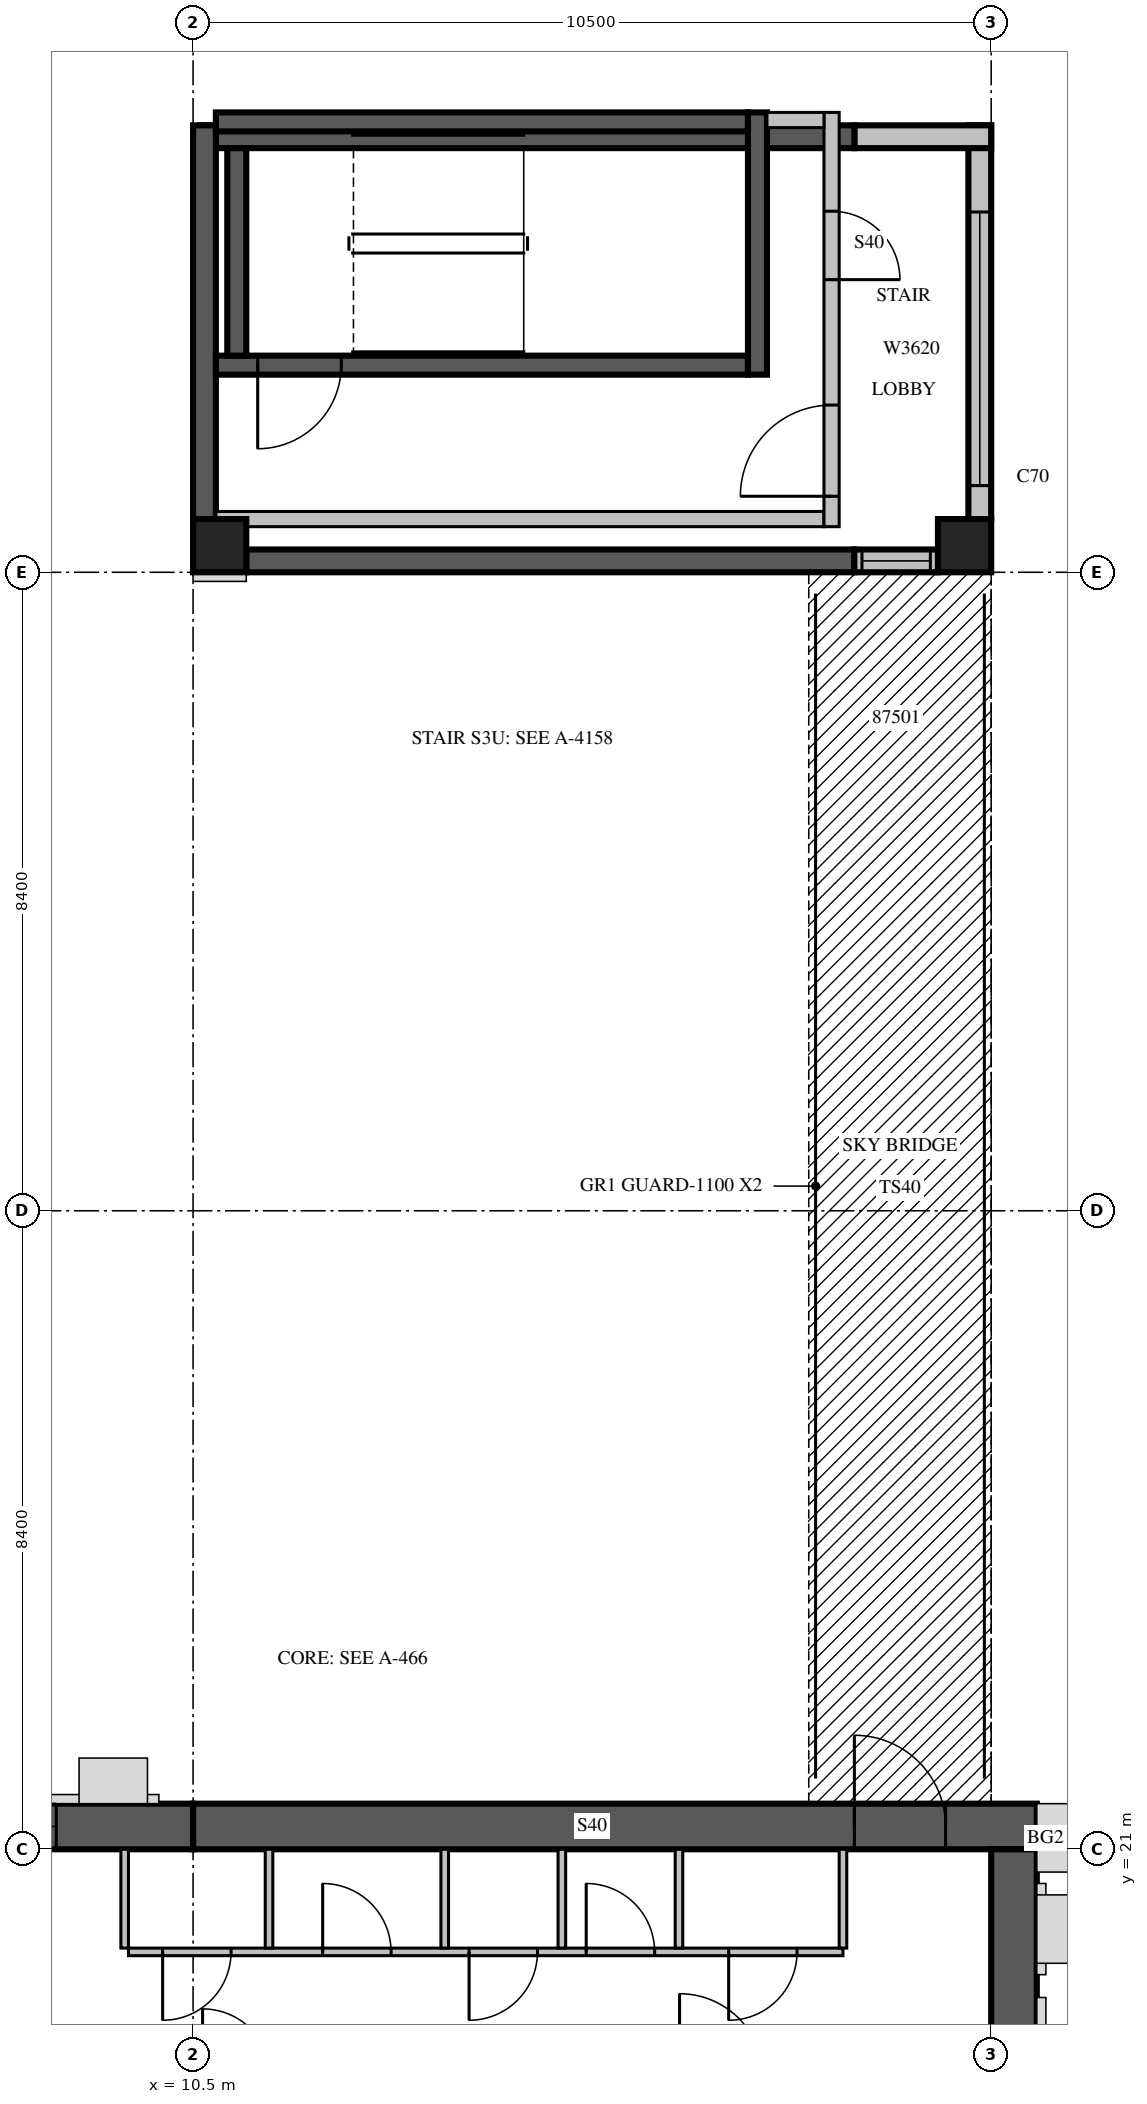
"""IFC4 building model, lengths in metres.
Left out: names, types, materials, properties, quantities, classifications, styles, units other than length and angle.
Written with IfcOpenShell. Run it as: python <this file> out.ifc"""

import sys

from ifc_helpers import new_model, si_unit, direction, frame, frame_2d, origin, origin_2d, place, context, subcontext, project, spatial, rectangle, extrude, source, transform, mapped, element, fill, save


model = new_model("IFC4")
c1 = context("Model", 3, precision=1e-05, world=origin(), true_north=direction((0.0, 1.0)))
c2 = subcontext(c1, "Body", "Model", "MODEL_VIEW")
j1 = project(units=[si_unit("LENGTHUNIT", "METRE"), si_unit("PLANEANGLEUNIT", "RADIAN")], contexts=[c1])
p1 = place(None, origin())
s1 = spatial("IfcSite", under=j1, at=p1, CompositionType="ELEMENT")
p2 = place(p1, origin())
s2 = spatial("IfcBuilding", under=s1, at=p2, CompositionType="ELEMENT")
p3 = place(p2, frame((0.0, 0.0, 323.0)))
s3 = spatial("IfcBuildingStorey", under=s2, at=p3, CompositionType="ELEMENT", Elevation=323.0)
m1 = source(origin(), c2, "Body", "SweptSolid", [
    extrude(rectangle(XDim=0.7, YDim=0.7, at=origin_2d()), origin(), (0.0, 0.0, 1.0), 3.5),
])
for number, where, z_axis, x_axis in (
    (1, (10.85, 38.15, 0.0), (0.0, 0.0, 1.0), (1.0, 0.0, 0.0)),
    (2, (20.65, 38.15, 0.0), (0.0, 0.0, 1.0), (1.0, 0.0, 0.0)),
):
    element("IfcColumn", number, at=place(p3, frame(where, z_axis=z_axis, x_axis=x_axis)), inside=s3, PredefinedType="COLUMN", context=c2, shape_type="MappedRepresentation", body=[
        mapped(m1, transform((0.0, 0.0, 0.0), scale=1.0)),
    ])
m2 = source(origin(), c2, "Body", "SweptSolid", [
    extrude(rectangle(XDim=11.1, YDim=0.6, at=frame_2d((5.55, 0.0))), origin(), (0.0, 0.0, 1.0), 3.5),
])
p4 = place(p3, frame((10.5, 21.3, 0.0), z_axis=(0.0, 0.0, 1.0), x_axis=(1.0, 0.0, 0.0)))
e3 = element("IfcWall", 3, at=p4, inside=s3, PredefinedType="SHEAR", context=c2, shape_type="MappedRepresentation", body=[
    mapped(m2, transform((0.0, 0.0, 0.0), scale=1.0)),
])
m3 = source(origin(), c2, "Body", "SweptSolid", [
    extrude(rectangle(XDim=1.2, YDim=2.1, at=frame_2d((0.6, 1.05))), frame((0.0, 0.31, 0.0), z_axis=(0.0, -1.0, 0.0), x_axis=(1.0, 0.0, 0.0)), (0.0, 0.0, 1.0), 0.62),
])
p5 = place(p4, frame((8.7, 0.0, 0.0)))
e4 = element("IfcOpeningElement", 4, at=p5, cuts=e3, PredefinedType="OPENING", context=c2, shape_type="MappedRepresentation", body=[
    mapped(m3, transform((0.0, 0.0, 0.0), scale=1.0)),
])
m4 = source(origin(), c2, "Body", "SweptSolid", [
    extrude(rectangle(XDim=10.5, YDim=0.6, at=frame_2d((5.25, 0.0))), origin(), (0.0, 0.0, 1.0), 3.5),
])
p6 = place(p3, frame((21.3, 10.5, 0.0), z_axis=(0.0, 0.0, 1.0), x_axis=(0.0, 1.0, 0.0)))
e5 = element("IfcWall", 5, at=p6, inside=s3, PredefinedType="SHEAR", context=c2, shape_type="MappedRepresentation", body=[
    mapped(m4, transform((0.0, 0.0, 0.0), scale=1.0)),
])
m5 = source(origin(), c2, "Body", "SweptSolid", [
    extrude(rectangle(XDim=1.2, YDim=2.4, at=frame_2d((0.6, 1.2))), frame((0.0, 0.31, 0.0), z_axis=(0.0, -1.0, 0.0), x_axis=(1.0, 0.0, 0.0)), (0.0, 0.0, 1.0), 0.62),
])
p7 = place(p6, frame((5.7, 0.0, 0.6)))
e6 = element("IfcOpeningElement", 6, at=p7, cuts=e5, PredefinedType="OPENING", context=c2, shape_type="MappedRepresentation", body=[
    mapped(m5, transform((0.0, 0.0, 0.0), scale=1.0)),
])
m6 = source(origin(), c2, "Body", "SweptSolid", [
    extrude(rectangle(XDim=6.6, YDim=0.6, at=frame_2d((3.3, 0.0))), origin(), (0.0, 0.0, 1.0), 3.5),
])
p8 = place(p3, frame((3.9, 21.3, 0.0), z_axis=(0.0, 0.0, 1.0), x_axis=(1.0, 0.0, 0.0)))
e7 = element("IfcWall", 7, at=p8, inside=s3, PredefinedType="SHEAR", context=c2, shape_type="MappedRepresentation", body=[
    mapped(m6, transform((0.0, 0.0, 0.0), scale=1.0)),
])
p9 = place(p8, frame((1.5, 0.0, 0.6)))
e8 = element("IfcOpeningElement", 8, at=p9, cuts=e7, PredefinedType="OPENING", context=c2, shape_type="MappedRepresentation", body=[
    mapped(m5, transform((0.0, 0.0, 0.0), scale=1.0)),
])
p10 = place(p8, frame((3.6, 0.0, 0.6)))
e9 = element("IfcOpeningElement", 9, at=p10, cuts=e7, PredefinedType="OPENING", context=c2, shape_type="MappedRepresentation", body=[
    mapped(m5, transform((0.0, 0.0, 0.0), scale=1.0)),
])
m7 = source(origin(), c2, "Body", "SweptSolid", [
    extrude(rectangle(XDim=8.0, YDim=0.3, at=frame_2d((4.0, 0.0))), origin(), (0.0, 0.0, 1.0), 3.1),
])
p11 = place(p3, frame((11.2, 37.95, 0.0), z_axis=(0.0, 0.0, 1.0), x_axis=(1.0, 0.0, 0.0)))
e10 = element("IfcWall", 10, at=p11, inside=s3, PredefinedType="SOLIDWALL", context=c2, shape_type="MappedRepresentation", body=[
    mapped(m7, transform((0.0, 0.0, 0.0), scale=1.0)),
])
m8 = source(origin(), c2, "Body", "SweptSolid", [
    extrude(rectangle(XDim=1.1, YDim=0.3, at=frame_2d((0.55, 0.0))), origin(), (0.0, 0.0, 1.0), 3.1),
])
p12 = place(p3, frame((19.2, 37.95, 0.0), z_axis=(0.0, 0.0, 1.0), x_axis=(1.0, 0.0, 0.0)))
e11 = element("IfcWall", 11, at=p12, inside=s3, PredefinedType="STANDARD", context=c2, shape_type="MappedRepresentation", body=[
    mapped(m8, transform((0.0, 0.0, 0.0), scale=1.0)),
])
m9 = source(origin(), c2, "Body", "SweptSolid", [
    extrude(rectangle(XDim=0.9, YDim=2.1, at=frame_2d((0.45, 1.05))), frame((0.0, 0.16, 0.0), z_axis=(0.0, -1.0, 0.0), x_axis=(1.0, 0.0, 0.0)), (0.0, 0.0, 1.0), 0.32),
])
p13 = place(p12, frame((0.1, 0.0, 0.0)))
e12 = element("IfcOpeningElement", 12, at=p13, cuts=e11, PredefinedType="OPENING", context=c2, shape_type="MappedRepresentation", body=[
    mapped(m9, transform((0.0, 0.0, 0.0), scale=1.0)),
])
m10 = source(origin(), c2, "Body", "SweptSolid", [
    extrude(rectangle(XDim=5.18, YDim=0.3, at=frame_2d((2.59, 0.0))), origin(), (0.0, 0.0, 1.0), 3.1),
])
p14 = place(p3, frame((20.85, 38.5, 0.0), z_axis=(0.0, 0.0, 1.0), x_axis=(0.0, 1.0, 0.0)))
e13 = element("IfcWall", 13, at=p14, inside=s3, PredefinedType="STANDARD", context=c2, shape_type="MappedRepresentation", body=[
    mapped(m10, transform((0.0, 0.0, 0.0), scale=1.0)),
])
m11 = source(origin(), c2, "Body", "SweptSolid", [
    extrude(rectangle(XDim=3.6, YDim=2.0, at=frame_2d((1.8, 1.0))), frame((0.0, 0.16, 0.0), z_axis=(0.0, -1.0, 0.0), x_axis=(1.0, 0.0, 0.0)), (0.0, 0.0, 1.0), 0.32),
])
p15 = place(p14, frame((0.44, 0.0, 0.6)))
e14 = element("IfcOpeningElement", 14, at=p15, cuts=e13, PredefinedType="OPENING", context=c2, shape_type="MappedRepresentation", body=[
    mapped(m11, transform((0.0, 0.0, 0.0), scale=1.0)),
])
m12 = source(origin(), c2, "Body", "SweptSolid", [
    extrude(rectangle(XDim=1.8, YDim=0.3, at=frame_2d((0.9, 0.0))), origin(), (0.0, 0.0, 1.0), 3.1),
])
p16 = place(p3, frame((21.0, 43.53, 0.0), z_axis=(0.0, 0.0, 1.0), x_axis=(-1.0, 0.0, 0.0)))
e15 = element("IfcWall", 15, at=p16, inside=s3, PredefinedType="STANDARD", context=c2, shape_type="MappedRepresentation", body=[
    mapped(m12, transform((0.0, 0.0, 0.0), scale=1.0)),
])
m13 = source(origin(), c2, "Body", "SweptSolid", [
    extrude(rectangle(XDim=8.6, YDim=0.3, at=frame_2d((4.3, 0.0))), origin(), (0.0, 0.0, 1.0), 3.1),
])
p17 = place(p3, frame((19.2, 43.53, 0.0), z_axis=(0.0, 0.0, 1.0), x_axis=(-1.0, 0.0, 0.0)))
e16 = element("IfcWall", 16, at=p17, inside=s3, PredefinedType="SOLIDWALL", context=c2, shape_type="MappedRepresentation", body=[
    mapped(m13, transform((0.0, 0.0, 0.0), scale=1.0)),
])
m14 = source(origin(), c2, "Body", "SweptSolid", [
    extrude(rectangle(XDim=5.18, YDim=0.3, at=frame_2d((2.59, 0.0))), origin(), (0.0, 0.0, 1.0), 3.1),
])
p18 = place(p3, frame((10.65, 43.68, 0.0), z_axis=(0.0, 0.0, 1.0), x_axis=(0.0, -1.0, 0.0)))
e17 = element("IfcWall", 17, at=p18, inside=s3, PredefinedType="SOLIDWALL", context=c2, shape_type="MappedRepresentation", body=[
    mapped(m14, transform((0.0, 0.0, 0.0), scale=1.0)),
])
m15 = source(origin(), c2, "Body", "SweptSolid", [
    extrude(rectangle(XDim=9.4, YDim=0.1, at=frame_2d((4.7, 0.0))), origin(), (0.0, 0.0, 1.0), 3.1),
])
p19 = place(p3, frame((9.65, 19.65, 0.0), z_axis=(0.0, 0.0, 1.0), x_axis=(1.0, 0.0, 0.0)))
e18 = element("IfcWall", 18, at=p19, inside=s3, PredefinedType="PARTITIONING", context=c2, shape_type="MappedRepresentation", body=[
    mapped(m15, transform((0.0, 0.0, 0.0), scale=1.0)),
])
m16 = source(origin(), c2, "Body", "SweptSolid", [
    extrude(rectangle(XDim=0.9, YDim=2.1, at=frame_2d((0.45, 1.05))), frame((0.0, 0.06, 0.0), z_axis=(0.0, -1.0, 0.0), x_axis=(1.0, 0.0, 0.0)), (0.0, 0.0, 1.0), 0.12),
])
p20 = place(p19, frame((0.45, 0.0, 0.0)))
e19 = element("IfcOpeningElement", 19, at=p20, cuts=e18, PredefinedType="OPENING", context=c2, shape_type="MappedRepresentation", body=[
    mapped(m16, transform((0.0, 0.0, 0.0), scale=1.0)),
])
p21 = place(p19, frame((2.555, 0.0, 0.0)))
e20 = element("IfcOpeningElement", 20, at=p21, cuts=e18, PredefinedType="OPENING", context=c2, shape_type="MappedRepresentation", body=[
    mapped(m16, transform((0.0, 0.0, 0.0), scale=1.0)),
])
p22 = place(p19, frame((4.481, 0.0, 0.0)))
e21 = element("IfcOpeningElement", 21, at=p22, cuts=e18, PredefinedType="OPENING", context=c2, shape_type="MappedRepresentation", body=[
    mapped(m16, transform((0.0, 0.0, 0.0), scale=1.0)),
])
p23 = place(p19, frame((6.022, 0.0, 0.0)))
e22 = element("IfcOpeningElement", 22, at=p23, cuts=e18, PredefinedType="OPENING", context=c2, shape_type="MappedRepresentation", body=[
    mapped(m16, transform((0.0, 0.0, 0.0), scale=1.0)),
])
p24 = place(p19, frame((7.896, 0.0, 0.0)))
e23 = element("IfcOpeningElement", 23, at=p24, cuts=e18, PredefinedType="OPENING", context=c2, shape_type="MappedRepresentation", body=[
    mapped(m16, transform((0.0, 0.0, 0.0), scale=1.0)),
])
m17 = source(origin(), c2, "Body", "SweptSolid", [
    extrude(rectangle(XDim=1.3, YDim=0.1, at=frame_2d((0.65, 0.0))), origin(), (0.0, 0.0, 1.0), 3.1),
])
for number, where, z_axis, x_axis in (
    (24, (11.499, 19.7, 0.0), (0.0, 0.0, 1.0), (0.0, 1.0, 0.0)),
    (25, (13.811, 19.7, 0.0), (0.0, 0.0, 1.0), (0.0, 1.0, 0.0)),
    (26, (15.352, 19.7, 0.0), (0.0, 0.0, 1.0), (0.0, 1.0, 0.0)),
    (27, (16.893, 19.7, 0.0), (0.0, 0.0, 1.0), (0.0, 1.0, 0.0)),
    (28, (9.6, 19.7, 0.0), (0.0, 0.0, 1.0), (0.0, 1.0, 0.0)),
    (29, (19.05, 19.7, 0.0), (0.0, 0.0, 1.0), (0.0, 1.0, 0.0)),
):
    element("IfcWall", number, at=place(p3, frame(where, z_axis=z_axis, x_axis=x_axis)), inside=s3, PredefinedType="PARTITIONING", context=c2, shape_type="MappedRepresentation", body=[
        mapped(m17, transform((0.0, 0.0, 0.0), scale=1.0)),
    ])
m18 = source(origin(), c2, "Body", "SweptSolid", [
    extrude(rectangle(XDim=7.0, YDim=0.25, at=frame_2d((3.5, 0.0))), origin(), (0.0, 0.0, 1.0), 3.1),
])
p25 = place(p3, frame((10.8, 40.525, 0.0), z_axis=(0.0, 0.0, 1.0), x_axis=(1.0, 0.0, 0.0)))
e30 = element("IfcWall", 30, at=p25, inside=s3, PredefinedType="SOLIDWALL", context=c2, shape_type="MappedRepresentation", body=[
    mapped(m18, transform((0.0, 0.0, 0.0), scale=1.0)),
])
m19 = source(origin(), c2, "Body", "SweptSolid", [
    extrude(rectangle(XDim=1.1, YDim=2.1, at=frame_2d((0.55, 1.05))), frame((0.0, 0.135, 0.0), z_axis=(0.0, -1.0, 0.0), x_axis=(1.0, 0.0, 0.0)), (0.0, 0.0, 1.0), 0.27),
])
p26 = place(p25, frame((0.55, 0.0, 0.0)))
e31 = element("IfcOpeningElement", 31, at=p26, cuts=e30, PredefinedType="OPENING", context=c2, shape_type="MappedRepresentation", body=[
    mapped(m19, transform((0.0, 0.0, 0.0), scale=1.0)),
])
p27 = place(p3, frame((10.8, 43.725, 0.0), z_axis=(0.0, 0.0, 1.0), x_axis=(1.0, 0.0, 0.0)))
e32 = element("IfcWall", 32, at=p27, inside=s3, PredefinedType="SOLIDWALL", context=c2, shape_type="MappedRepresentation", body=[
    mapped(m18, transform((0.0, 0.0, 0.0), scale=1.0)),
])
m20 = source(origin(), c2, "Body", "SweptSolid", [
    extrude(rectangle(XDim=3.45, YDim=0.25, at=frame_2d((1.725, 0.0))), origin(), (0.0, 0.0, 1.0), 3.1),
])
p28 = place(p3, frame((17.925, 40.4, 0.0), z_axis=(0.0, 0.0, 1.0), x_axis=(0.0, 1.0, 0.0)))
e33 = element("IfcWall", 33, at=p28, inside=s3, PredefinedType="SOLIDWALL", context=c2, shape_type="MappedRepresentation", body=[
    mapped(m20, transform((0.0, 0.0, 0.0), scale=1.0)),
])
m21 = source(origin(), c2, "Body", "SweptSolid", [
    extrude(rectangle(XDim=2.73, YDim=0.25, at=frame_2d((1.365, 0.0))), origin(), (0.0, 0.0, 1.0), 3.1),
])
p29 = place(p3, frame((11.075, 40.65, 0.0), z_axis=(0.0, 0.0, 1.0), x_axis=(0.0, 1.0, 0.0)))
e34 = element("IfcWall", 34, at=p29, inside=s3, PredefinedType="SOLIDWALL", context=c2, shape_type="MappedRepresentation", body=[
    mapped(m21, transform((0.0, 0.0, 0.0), scale=1.0)),
])
m22 = source(origin(), c2, "Body", "SweptSolid", [
    extrude(rectangle(XDim=8.0, YDim=0.2, at=frame_2d((4.0, 0.0))), origin(), (0.0, 0.0, 1.0), 3.1),
])
p30 = place(p3, frame((10.8, 38.5, 0.0), z_axis=(0.0, 0.0, 1.0), x_axis=(1.0, 0.0, 0.0)))
e35 = element("IfcWall", 35, at=p30, inside=s3, PredefinedType="PARTITIONING", context=c2, shape_type="MappedRepresentation", body=[
    mapped(m22, transform((0.0, 0.0, 0.0), scale=1.0)),
])
m23 = source(origin(), c2, "Body", "SweptSolid", [
    extrude(rectangle(XDim=5.45, YDim=0.2, at=frame_2d((2.725, 0.0))), origin(), (0.0, 0.0, 1.0), 3.1),
])
p31 = place(p3, frame((18.9, 38.4, 0.0), z_axis=(0.0, 0.0, 1.0), x_axis=(0.0, 1.0, 0.0)))
e36 = element("IfcWall", 36, at=p31, inside=s3, PredefinedType="PARTITIONING", context=c2, shape_type="MappedRepresentation", body=[
    mapped(m23, transform((0.0, 0.0, 0.0), scale=1.0)),
])
m24 = source(origin(), c2, "Body", "SweptSolid", [
    extrude(rectangle(XDim=1.2, YDim=2.1, at=frame_2d((0.6, 1.05))), frame((0.0, 0.11, 0.0), z_axis=(0.0, -1.0, 0.0), x_axis=(1.0, 0.0, 0.0)), (0.0, 0.0, 1.0), 0.22),
])
p32 = place(p31, frame((0.4, 0.0, 0.0)))
e37 = element("IfcOpeningElement", 37, at=p32, cuts=e36, PredefinedType="OPENING", context=c2, shape_type="MappedRepresentation", body=[
    mapped(m24, transform((0.0, 0.0, 0.0), scale=1.0)),
])
m25 = source(origin(), c2, "Body", "SweptSolid", [
    extrude(rectangle(XDim=0.9, YDim=2.1, at=frame_2d((0.45, 1.05))), frame((0.0, 0.11, 0.0), z_axis=(0.0, -1.0, 0.0), x_axis=(1.0, 0.0, 0.0)), (0.0, 0.0, 1.0), 0.22),
])
p33 = place(p31, frame((3.25, 0.0, 0.0)))
e38 = element("IfcOpeningElement", 38, at=p33, cuts=e36, PredefinedType="OPENING", context=c2, shape_type="MappedRepresentation", body=[
    mapped(m25, transform((0.0, 0.0, 0.0), scale=1.0)),
])
m26 = source(origin(), c2, "Body", "SweptSolid", [
    extrude(rectangle(XDim=0.75, YDim=0.2, at=frame_2d((0.375, 0.0))), origin(), (0.0, 0.0, 1.0), 3.1),
])
p34 = place(p3, frame((18.05, 43.75, 0.0), z_axis=(0.0, 0.0, 1.0), x_axis=(1.0, 0.0, 0.0)))
e39 = element("IfcWall", 39, at=p34, inside=s3, PredefinedType="PARTITIONING", context=c2, shape_type="MappedRepresentation", body=[
    mapped(m26, transform((0.0, 0.0, 0.0), scale=1.0)),
])
m27 = source(origin(), c2, "Body", "SweptSolid", [
    extrude(rectangle(XDim=3.6, YDim=2.0, at=frame_2d((1.8, 1.0))), frame((0.0, 0.03, 0.0), z_axis=(0.0, -1.0, 0.0), x_axis=(1.0, 0.0, 0.0)), (0.0, 0.0, 1.0), 0.06),
])
p35 = place(p15, origin())
e40 = element("IfcWindow", 40, at=p35, inside=s3, PartitioningType="SINGLE_PANEL", PredefinedType="WINDOW", context=c2, shape_type="MappedRepresentation", body=[
    mapped(m27, transform((0.0, 0.0, 0.0), scale=1.0)),
])
fill(e14, e40)
m28 = source(origin(), c2, "Body", "SweptSolid", [
    extrude(rectangle(XDim=0.9, YDim=2.1, at=frame_2d((0.45, 1.05))), frame((0.0, 0.025, 0.0), z_axis=(0.0, -1.0, 0.0), x_axis=(1.0, 0.0, 0.0)), (0.0, 0.0, 1.0), 0.05),
])
p36 = place(p13, origin())
e41 = element("IfcDoor", 41, at=p36, inside=s3, OperationType="SLIDING_TO_LEFT", PredefinedType="DOOR", context=c2, shape_type="MappedRepresentation", body=[
    mapped(m28, transform((0.0, 0.0, 0.0), scale=1.0)),
])
fill(e12, e41)
p37 = place(p20, origin())
e42 = element("IfcDoor", 42, at=p37, inside=s3, OperationType="SINGLE_SWING_RIGHT", PredefinedType="DOOR", context=c2, shape_type="MappedRepresentation", body=[
    mapped(m28, transform((0.0, 0.0, 0.0), scale=1.0)),
])
fill(e19, e42)
p38 = place(p21, origin())
e43 = element("IfcDoor", 43, at=p38, inside=s3, OperationType="SINGLE_SWING_LEFT", PredefinedType="DOOR", context=c2, shape_type="MappedRepresentation", body=[
    mapped(m28, transform((0.0, 0.0, 0.0), scale=1.0)),
])
fill(e20, e43)
p39 = place(p22, origin())
e44 = element("IfcDoor", 44, at=p39, inside=s3, OperationType="SINGLE_SWING_RIGHT", PredefinedType="DOOR", context=c2, shape_type="MappedRepresentation", body=[
    mapped(m28, transform((0.0, 0.0, 0.0), scale=1.0)),
])
fill(e21, e44)
p40 = place(p23, origin())
e45 = element("IfcDoor", 45, at=p40, inside=s3, OperationType="SINGLE_SWING_LEFT", PredefinedType="DOOR", context=c2, shape_type="MappedRepresentation", body=[
    mapped(m28, transform((0.0, 0.0, 0.0), scale=1.0)),
])
fill(e22, e45)
p41 = place(p24, origin())
e46 = element("IfcDoor", 46, at=p41, inside=s3, OperationType="SINGLE_SWING_RIGHT", PredefinedType="DOOR", context=c2, shape_type="MappedRepresentation", body=[
    mapped(m28, transform((0.0, 0.0, 0.0), scale=1.0)),
])
fill(e23, e46)
m29 = source(origin(), c2, "Body", "SweptSolid", [
    extrude(rectangle(XDim=1.1, YDim=2.1, at=frame_2d((0.55, 1.05))), frame((0.0, 0.025, 0.0), z_axis=(0.0, -1.0, 0.0), x_axis=(1.0, 0.0, 0.0)), (0.0, 0.0, 1.0), 0.05),
])
p42 = place(p26, origin())
e47 = element("IfcDoor", 47, at=p42, inside=s3, OperationType="SINGLE_SWING_RIGHT", PredefinedType="DOOR", context=c2, shape_type="MappedRepresentation", body=[
    mapped(m29, transform((0.0, 0.0, 0.0), scale=1.0)),
])
fill(e31, e47)
m30 = source(origin(), c2, "Body", "SweptSolid", [
    extrude(rectangle(XDim=1.2, YDim=2.1, at=frame_2d((0.6, 1.05))), frame((0.0, 0.025, 0.0), z_axis=(0.0, -1.0, 0.0), x_axis=(1.0, 0.0, 0.0)), (0.0, 0.0, 1.0), 0.05),
])
p43 = place(p32, origin())
e48 = element("IfcDoor", 48, at=p43, inside=s3, OperationType="SINGLE_SWING_LEFT", PredefinedType="DOOR", context=c2, shape_type="MappedRepresentation", body=[
    mapped(m30, transform((0.0, 0.0, 0.0), scale=1.0)),
])
fill(e37, e48)
p44 = place(p33, origin())
e49 = element("IfcDoor", 49, at=p44, inside=s3, OperationType="SINGLE_SWING_RIGHT", PredefinedType="DOOR", context=c2, shape_type="MappedRepresentation", body=[
    mapped(m28, transform((0.0, 0.0, 0.0), scale=1.0)),
])
fill(e38, e49)
p45 = place(p5, origin())
e50 = element("IfcDoor", 50, at=p45, inside=s3, OperationType="SINGLE_SWING_LEFT", PredefinedType="DOOR", context=c2, shape_type="MappedRepresentation", body=[
    mapped(m30, transform((0.0, 0.0, 0.0), scale=1.0)),
])
fill(e4, e50)
m31 = source(origin(), c2, "Body", "SweptSolid", [
    extrude(rectangle(XDim=1.2, YDim=2.4, at=frame_2d((0.6, 1.2))), frame((0.0, 0.03, 0.0), z_axis=(0.0, -1.0, 0.0), x_axis=(1.0, 0.0, 0.0)), (0.0, 0.0, 1.0), 0.06),
])
p46 = place(p10, origin())
e51 = element("IfcWindow", 51, at=p46, inside=s3, PartitioningType="SINGLE_PANEL", PredefinedType="WINDOW", context=c2, shape_type="MappedRepresentation", body=[
    mapped(m31, transform((0.0, 0.0, 0.0), scale=1.0)),
])
fill(e9, e51)
save(model, sys.argv[1])
